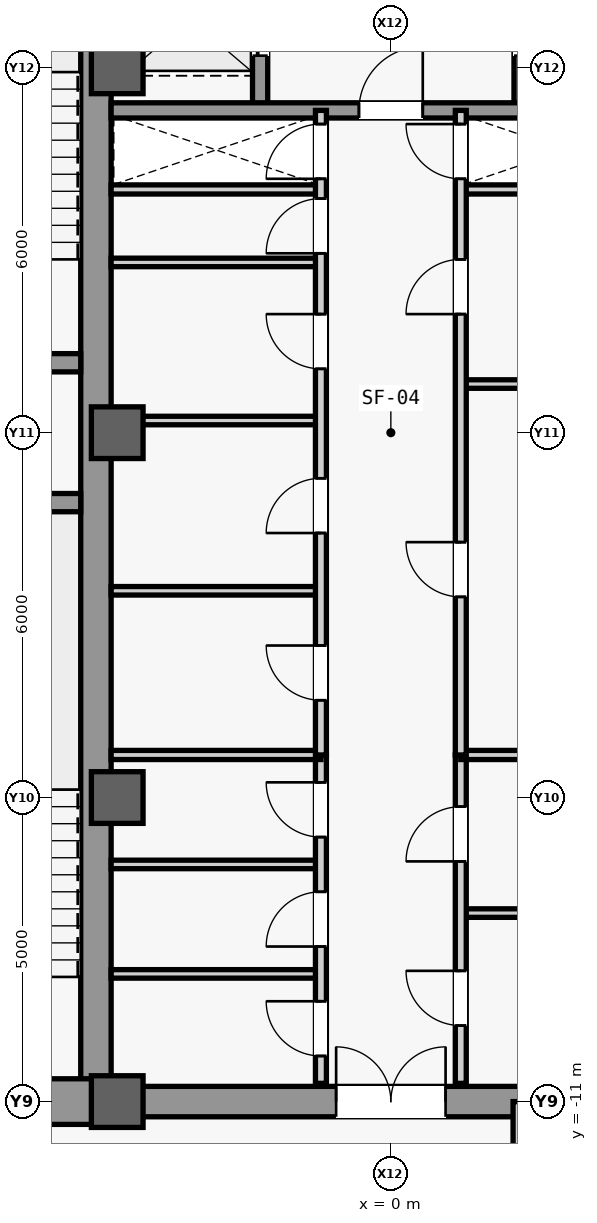
"""IFC4 building model, lengths in metres.
Left out: names, types, materials, properties, quantities, classifications, styles, units other than length and angle.
Written with IfcOpenShell. Run it as: python <this file> out.ifc"""

import sys

from ifc_helpers import new_model, si_unit, direction, frame, frame_2d, origin, origin_2d, place, context, subcontext, project, spatial, rectangle, extrude, source, transform, mapped, element, fill, save


model = new_model("IFC4")
c1 = context("Model", 3, precision=1e-05, world=origin(), true_north=direction((0.0, 1.0)))
c2 = subcontext(c1, "Body", "Model", "MODEL_VIEW")
j1 = project(units=[si_unit("LENGTHUNIT", "METRE"), si_unit("PLANEANGLEUNIT", "RADIAN")], contexts=[c1])
p1 = place(None, origin())
s1 = spatial("IfcSite", under=j1, at=p1, CompositionType="ELEMENT")
p2 = place(p1, origin())
s2 = spatial("IfcBuilding", under=s1, at=p2, CompositionType="ELEMENT")
p3 = place(p2, frame((0.0, 0.0, 195.1)))
s3 = spatial("IfcBuildingStorey", under=s2, at=p3, CompositionType="ELEMENT", Elevation=195.1)
m1 = source(origin(), c2, "Body", "SweptSolid", [
    extrude(rectangle(XDim=21.4, YDim=0.5, at=frame_2d((10.7, 0.0))), origin(), (0.0, 0.0, 1.0), 3.78),
])
p4 = place(p3, frame((-4.85, -10.7, 0.0), z_axis=(0.0, 0.0, 1.0), x_axis=(0.0, 1.0, 0.0)))
e1 = element("IfcWall", 1, at=p4, inside=s3, PredefinedType="SHEAR", context=c2, shape_type="MappedRepresentation", body=[
    mapped(m1, transform((0.0, 0.0, 0.0), scale=1.0)),
])
m2 = source(origin(), c2, "Body", "SweptSolid", [
    extrude(rectangle(XDim=5.85, YDim=0.75, at=frame_2d((2.925, 0.0))), origin(), (0.0, 0.0, 1.0), 3.78),
])
p5 = place(p3, frame((-10.7, -11.0, 0.0), z_axis=(0.0, 0.0, 1.0), x_axis=(1.0, 0.0, 0.0)))
e2 = element("IfcWall", 2, at=p5, inside=s3, PredefinedType="SHEAR", context=c2, shape_type="MappedRepresentation", body=[
    mapped(m2, transform((0.0, 0.0, 0.0), scale=1.0)),
])
m3 = source(origin(), c2, "Body", "SweptSolid", [
    extrude(rectangle(XDim=5.6, YDim=0.3, at=frame_2d((2.8, 0.0))), origin(), (0.0, 0.0, 1.0), 3.78),
])
for number, where, z_axis, x_axis in (
    (3, (-10.7, -1.15, 0.0), (0.0, 0.0, 1.0), (1.0, 0.0, 0.0)),
    (4, (-10.7, 1.15, 0.0), (0.0, 0.0, 1.0), (1.0, 0.0, 0.0)),
):
    element("IfcWall", number, at=place(p3, frame(where, z_axis=z_axis, x_axis=x_axis)), inside=s3, PredefinedType="SHEAR", context=c2, shape_type="MappedRepresentation", body=[
        mapped(m3, transform((0.0, 0.0, 0.0), scale=1.0)),
    ])
m4 = source(origin(), c2, "Body", "SweptSolid", [
    extrude(rectangle(XDim=9.2, YDim=0.5, at=frame_2d((4.6, 0.0))), origin(), (0.0, 0.0, 1.0), 3.78),
])
p6 = place(p3, frame((-4.6, -11.0, 0.0), z_axis=(0.0, 0.0, 1.0), x_axis=(1.0, 0.0, 0.0)))
e5 = element("IfcWall", 5, at=p6, inside=s3, PredefinedType="SHEAR", context=c2, shape_type="MappedRepresentation", body=[
    mapped(m4, transform((0.0, 0.0, 0.0), scale=1.0)),
])
m5 = source(origin(), c2, "Body", "SweptSolid", [
    extrude(rectangle(XDim=1.8, YDim=2.25, at=frame_2d((0.9, 1.125))), frame((0.0, 0.26, 0.0), z_axis=(0.0, -1.0, 0.0), x_axis=(1.0, 0.0, 0.0)), (0.0, 0.0, 1.0), 0.52),
])
p7 = place(p6, frame((3.7, 0.0, 0.0)))
e6 = element("IfcOpeningElement", 6, at=p7, cuts=e5, PredefinedType="OPENING", context=c2, shape_type="MappedRepresentation", body=[
    mapped(m5, transform((0.0, 0.0, 0.0), scale=1.0)),
])
m6 = source(origin(), c2, "Body", "SweptSolid", [
    extrude(rectangle(XDim=0.85, YDim=0.85, at=origin_2d()), origin(), (0.0, 0.0, 1.0), 4.0),
])
for number, where, z_axis, x_axis in (
    (7, (-4.5, -11.0, 0.0), (0.0, 0.0, 1.0), (1.0, 0.0, 0.0)),
    (8, (-4.5, -6.0, 0.0), (0.0, 0.0, 1.0), (1.0, 0.0, 0.0)),
    (9, (-4.5, 0.0, 0.0), (0.0, 0.0, 1.0), (1.0, 0.0, 0.0)),
    (10, (-4.5, 6.0, 0.0), (0.0, 0.0, 1.0), (1.0, 0.0, 0.0)),
):
    element("IfcColumn", number, at=place(p3, frame(where, z_axis=z_axis, x_axis=x_axis)), inside=s3, PredefinedType="COLUMN", context=c2, shape_type="MappedRepresentation", body=[
        mapped(m6, transform((0.0, 0.0, 0.0), scale=1.0)),
    ])
m7 = source(origin(), c2, "Body", "SweptSolid", [
    extrude(rectangle(XDim=3.45, YDim=0.15, at=frame_2d((1.725, 0.0))), origin(), (0.0, 0.0, 1.0), 3.78),
])
for number, where, z_axis, x_axis in (
    (11, (-4.6, 4.0, 0.0), (0.0, 0.0, 1.0), (1.0, 0.0, 0.0)),
    (12, (1.15, 4.0, 0.0), (0.0, 0.0, 1.0), (1.0, 0.0, 0.0)),
):
    element("IfcWall", number, at=place(p3, frame(where, z_axis=z_axis, x_axis=x_axis)), inside=s3, PredefinedType="PARTITIONING", context=c2, shape_type="MappedRepresentation", body=[
        mapped(m7, transform((0.0, 0.0, 0.0), scale=1.0)),
    ])
m8 = source(origin(), c2, "Body", "SweptSolid", [
    extrude(rectangle(XDim=3.45, YDim=0.14, at=frame_2d((1.725, 0.0))), origin(), (0.0, 0.0, 1.0), 3.78),
])
for number, where, z_axis, x_axis in (
    (13, (-4.6, -8.9, 0.0), (0.0, 0.0, 1.0), (1.0, 0.0, 0.0)),
    (14, (-4.6, -7.1, 0.0), (0.0, 0.0, 1.0), (1.0, 0.0, 0.0)),
):
    element("IfcWall", number, at=place(p3, frame(where, z_axis=z_axis, x_axis=x_axis)), inside=s3, PredefinedType="PARTITIONING", context=c2, shape_type="MappedRepresentation", body=[
        mapped(m8, transform((0.0, 0.0, 0.0), scale=1.0)),
    ])
m9 = source(origin(), c2, "Body", "SweptSolid", [
    extrude(rectangle(XDim=5.4, YDim=0.18, at=frame_2d((2.7, 0.0))), origin(), (0.0, 0.0, 1.0), 3.78),
])
p8 = place(p3, frame((-1.15, -10.7, 0.0), z_axis=(0.0, 0.0, 1.0), x_axis=(0.0, 1.0, 0.0)))
e15 = element("IfcWall", 15, at=p8, inside=s3, PredefinedType="PARTITIONING", context=c2, shape_type="MappedRepresentation", body=[
    mapped(m9, transform((0.0, 0.0, 0.0), scale=1.0)),
])
m10 = source(origin(), c2, "Body", "SweptSolid", [
    extrude(rectangle(XDim=0.9, YDim=2.15, at=frame_2d((0.45, 1.075))), frame((0.0, 0.1, 0.0), z_axis=(0.0, -1.0, 0.0), x_axis=(1.0, 0.0, 0.0)), (0.0, 0.0, 1.0), 0.2),
])
p9 = place(p8, frame((0.45, 0.0, 0.0)))
e16 = element("IfcOpeningElement", 16, at=p9, cuts=e15, PredefinedType="OPENING", context=c2, shape_type="MappedRepresentation", body=[
    mapped(m10, transform((0.0, 0.0, 0.0), scale=1.0)),
])
p10 = place(p8, frame((2.25, 0.0, 0.0)))
e17 = element("IfcOpeningElement", 17, at=p10, cuts=e15, PredefinedType="OPENING", context=c2, shape_type="MappedRepresentation", body=[
    mapped(m10, transform((0.0, 0.0, 0.0), scale=1.0)),
])
p11 = place(p8, frame((4.05, 0.0, 0.0)))
e18 = element("IfcOpeningElement", 18, at=p11, cuts=e15, PredefinedType="OPENING", context=c2, shape_type="MappedRepresentation", body=[
    mapped(m10, transform((0.0, 0.0, 0.0), scale=1.0)),
])
p12 = place(p3, frame((1.15, -7.9, 0.0), z_axis=(0.0, 0.0, 1.0), x_axis=(1.0, 0.0, 0.0)))
e19 = element("IfcWall", 19, at=p12, inside=s3, PredefinedType="PARTITIONING", context=c2, shape_type="MappedRepresentation", body=[
    mapped(m8, transform((0.0, 0.0, 0.0), scale=1.0)),
])
p13 = place(p3, frame((1.15, -10.7, 0.0), z_axis=(0.0, 0.0, 1.0), x_axis=(0.0, 1.0, 0.0)))
e20 = element("IfcWall", 20, at=p13, inside=s3, PredefinedType="PARTITIONING", context=c2, shape_type="MappedRepresentation", body=[
    mapped(m9, transform((0.0, 0.0, 0.0), scale=1.0)),
])
p14 = place(p13, frame((0.95, 0.0, 0.0)))
e21 = element("IfcOpeningElement", 21, at=p14, cuts=e20, PredefinedType="OPENING", context=c2, shape_type="MappedRepresentation", body=[
    mapped(m10, transform((0.0, 0.0, 0.0), scale=1.0)),
])
p15 = place(p13, frame((3.65, 0.0, 0.0)))
e22 = element("IfcOpeningElement", 22, at=p15, cuts=e20, PredefinedType="OPENING", context=c2, shape_type="MappedRepresentation", body=[
    mapped(m10, transform((0.0, 0.0, 0.0), scale=1.0)),
])
for number, where, z_axis, x_axis in (
    (23, (-4.6, -5.3, 0.0), (0.0, 0.0, 1.0), (1.0, 0.0, 0.0)),
    (24, (1.15, -5.3, 0.0), (0.0, 0.0, 1.0), (1.0, 0.0, 0.0)),
):
    element("IfcWall", number, at=place(p3, frame(where, z_axis=z_axis, x_axis=x_axis)), inside=s3, PredefinedType="PARTITIONING", context=c2, shape_type="MappedRepresentation", body=[
        mapped(m7, transform((0.0, 0.0, 0.0), scale=1.0)),
    ])
m11 = source(origin(), c2, "Body", "SweptSolid", [
    extrude(rectangle(XDim=5.4, YDim=0.25, at=frame_2d((2.7, 0.0))), origin(), (0.0, 0.0, 1.0), 3.78),
])
p16 = place(p3, frame((-2.15, 5.3, 0.0), z_axis=(0.0, 0.0, 1.0), x_axis=(0.0, 1.0, 0.0)))
e25 = element("IfcWall", 25, at=p16, inside=s3, PredefinedType="SHEAR", context=c2, shape_type="MappedRepresentation", body=[
    mapped(m11, transform((0.0, 0.0, 0.0), scale=1.0)),
])
m12 = source(origin(), c2, "Body", "SweptSolid", [
    extrude(rectangle(XDim=1.2, YDim=2.3, at=frame_2d((0.6, 1.15))), frame((0.0, 0.135, 0.0), z_axis=(0.0, -1.0, 0.0), x_axis=(1.0, 0.0, 0.0)), (0.0, 0.0, 1.0), 0.27),
])
p17 = place(p16, frame((3.3, 0.0, 0.0)))
e26 = element("IfcOpeningElement", 26, at=p17, cuts=e25, PredefinedType="OPENING", context=c2, shape_type="MappedRepresentation", body=[
    mapped(m12, transform((0.0, 0.0, 0.0), scale=1.0)),
])
p18 = place(p16, frame((0.9, 0.0, 0.0)))
e27 = element("IfcOpeningElement", 27, at=p18, cuts=e25, PredefinedType="OPENING", context=c2, shape_type="MappedRepresentation", body=[
    mapped(m12, transform((0.0, 0.0, 0.0), scale=1.0)),
])
p19 = place(p3, frame((2.15, 5.3, 0.0), z_axis=(0.0, 0.0, 1.0), x_axis=(0.0, 1.0, 0.0)))
e28 = element("IfcWall", 28, at=p19, inside=s3, PredefinedType="SHEAR", context=c2, shape_type="MappedRepresentation", body=[
    mapped(m11, transform((0.0, 0.0, 0.0), scale=1.0)),
])
p20 = place(p19, frame((3.3, 0.0, 0.0)))
e29 = element("IfcOpeningElement", 29, at=p20, cuts=e28, PredefinedType="OPENING", context=c2, shape_type="MappedRepresentation", body=[
    mapped(m12, transform((0.0, 0.0, 0.0), scale=1.0)),
])
p21 = place(p19, frame((0.9, 0.0, 0.0)))
e30 = element("IfcOpeningElement", 30, at=p21, cuts=e28, PredefinedType="OPENING", context=c2, shape_type="MappedRepresentation", body=[
    mapped(m12, transform((0.0, 0.0, 0.0), scale=1.0)),
])
m13 = source(origin(), c2, "Body", "SweptSolid", [
    extrude(rectangle(XDim=9.2, YDim=0.25, at=frame_2d((4.6, 0.0))), origin(), (0.0, 0.0, 1.0), 3.78),
])
p22 = place(p3, frame((-4.6, 5.3, 0.0), z_axis=(0.0, 0.0, 1.0), x_axis=(1.0, 0.0, 0.0)))
e31 = element("IfcWall", 31, at=p22, inside=s3, PredefinedType="SHEAR", context=c2, shape_type="MappedRepresentation", body=[
    mapped(m13, transform((0.0, 0.0, 0.0), scale=1.0)),
])
m14 = source(origin(), c2, "Body", "SweptSolid", [
    extrude(rectangle(XDim=1.05, YDim=2.2, at=frame_2d((0.525, 1.1))), frame((0.0, 0.135, 0.0), z_axis=(0.0, -1.0, 0.0), x_axis=(1.0, 0.0, 0.0)), (0.0, 0.0, 1.0), 0.27),
])
p23 = place(p22, frame((4.075, 0.0, 0.0)))
e32 = element("IfcOpeningElement", 32, at=p23, cuts=e31, PredefinedType="OPENING", context=c2, shape_type="MappedRepresentation", body=[
    mapped(m14, transform((0.0, 0.0, 0.0), scale=1.0)),
])
p24 = place(p3, frame((-4.6, -2.6, 0.0), z_axis=(0.0, 0.0, 1.0), x_axis=(1.0, 0.0, 0.0)))
e33 = element("IfcWall", 33, at=p24, inside=s3, PredefinedType="PARTITIONING", context=c2, shape_type="MappedRepresentation", body=[
    mapped(m8, transform((0.0, 0.0, 0.0), scale=1.0)),
])
m15 = source(origin(), c2, "Body", "SweptSolid", [
    extrude(rectangle(XDim=3.45, YDim=0.14, at=frame_2d((1.725, 0.0))), origin(), (0.0, 0.0, 1.0), 3.085),
])
p25 = place(p3, frame((-4.6, 0.2, 0.0), z_axis=(0.0, 0.0, 1.0), x_axis=(1.0, 0.0, 0.0)))
e34 = element("IfcWall", 34, at=p25, inside=s3, PredefinedType="PARTITIONING", context=c2, shape_type="MappedRepresentation", body=[
    mapped(m15, transform((0.0, 0.0, 0.0), scale=1.0)),
])
p26 = place(p3, frame((-4.6, 2.8, 0.0), z_axis=(0.0, 0.0, 1.0), x_axis=(1.0, 0.0, 0.0)))
e35 = element("IfcWall", 35, at=p26, inside=s3, PredefinedType="PARTITIONING", context=c2, shape_type="MappedRepresentation", body=[
    mapped(m8, transform((0.0, 0.0, 0.0), scale=1.0)),
])
m16 = source(origin(), c2, "Body", "SweptSolid", [
    extrude(rectangle(XDim=10.6, YDim=0.18, at=frame_2d((5.3, 0.0))), origin(), (0.0, 0.0, 1.0), 3.78),
])
p27 = place(p3, frame((-1.15, -5.3, 0.0), z_axis=(0.0, 0.0, 1.0), x_axis=(0.0, 1.0, 0.0)))
e36 = element("IfcWall", 36, at=p27, inside=s3, PredefinedType="PARTITIONING", context=c2, shape_type="MappedRepresentation", body=[
    mapped(m16, transform((0.0, 0.0, 0.0), scale=1.0)),
])
p28 = place(p27, frame((0.9, 0.0, 0.0)))
e37 = element("IfcOpeningElement", 37, at=p28, cuts=e36, PredefinedType="OPENING", context=c2, shape_type="MappedRepresentation", body=[
    mapped(m10, transform((0.0, 0.0, 0.0), scale=1.0)),
])
p29 = place(p27, frame((3.65, 0.0, 0.0)))
e38 = element("IfcOpeningElement", 38, at=p29, cuts=e36, PredefinedType="OPENING", context=c2, shape_type="MappedRepresentation", body=[
    mapped(m10, transform((0.0, 0.0, 0.0), scale=1.0)),
])
p30 = place(p27, frame((6.35, 0.0, 0.0)))
e39 = element("IfcOpeningElement", 39, at=p30, cuts=e36, PredefinedType="OPENING", context=c2, shape_type="MappedRepresentation", body=[
    mapped(m10, transform((0.0, 0.0, 0.0), scale=1.0)),
])
p31 = place(p27, frame((8.25, 0.0, 0.0)))
e40 = element("IfcOpeningElement", 40, at=p31, cuts=e36, PredefinedType="OPENING", context=c2, shape_type="MappedRepresentation", body=[
    mapped(m10, transform((0.0, 0.0, 0.0), scale=1.0)),
])
p32 = place(p27, frame((9.475, 0.0, 0.0)))
e41 = element("IfcOpeningElement", 41, at=p32, cuts=e36, PredefinedType="OPENING", context=c2, shape_type="MappedRepresentation", body=[
    mapped(m10, transform((0.0, 0.0, 0.0), scale=1.0)),
])
p33 = place(p3, frame((1.15, 0.8, 0.0), z_axis=(0.0, 0.0, 1.0), x_axis=(1.0, 0.0, 0.0)))
e42 = element("IfcWall", 42, at=p33, inside=s3, PredefinedType="PARTITIONING", context=c2, shape_type="MappedRepresentation", body=[
    mapped(m8, transform((0.0, 0.0, 0.0), scale=1.0)),
])
p34 = place(p3, frame((1.15, -5.3, 0.0), z_axis=(0.0, 0.0, 1.0), x_axis=(0.0, 1.0, 0.0)))
e43 = element("IfcWall", 43, at=p34, inside=s3, PredefinedType="PARTITIONING", context=c2, shape_type="MappedRepresentation", body=[
    mapped(m16, transform((0.0, 0.0, 0.0), scale=1.0)),
])
p35 = place(p34, frame((2.6, 0.0, 0.0)))
e44 = element("IfcOpeningElement", 44, at=p35, cuts=e43, PredefinedType="OPENING", context=c2, shape_type="MappedRepresentation", body=[
    mapped(m10, transform((0.0, 0.0, 0.0), scale=1.0)),
])
p36 = place(p34, frame((7.25, 0.0, 0.0)))
e45 = element("IfcOpeningElement", 45, at=p36, cuts=e43, PredefinedType="OPENING", context=c2, shape_type="MappedRepresentation", body=[
    mapped(m10, transform((0.0, 0.0, 0.0), scale=1.0)),
])
p37 = place(p34, frame((9.475, 0.0, 0.0)))
e46 = element("IfcOpeningElement", 46, at=p37, cuts=e43, PredefinedType="OPENING", context=c2, shape_type="MappedRepresentation", body=[
    mapped(m10, transform((0.0, 0.0, 0.0), scale=1.0)),
])
m17 = source(origin(), c2, "Body", "SweptSolid", [
    extrude(rectangle(XDim=3.2, YDim=0.18, at=frame_2d((1.6, 0.0))), origin(), (0.0, 0.0, 1.0), 3.78),
])
p38 = place(p3, frame((2.1, -14.2, 0.0), z_axis=(0.0, 0.0, 1.0), x_axis=(0.0, 1.0, 0.0)))
e47 = element("IfcWall", 47, at=p38, inside=s3, PredefinedType="PARTITIONING", context=c2, shape_type="MappedRepresentation", body=[
    mapped(m17, transform((0.0, 0.0, 0.0), scale=1.0)),
])
m18 = source(origin(), c2, "Body", "SweptSolid", [
    extrude(rectangle(XDim=0.9, YDim=2.15, at=frame_2d((0.45, 1.075))), frame((0.0, 0.025, 0.0), z_axis=(0.0, -1.0, 0.0), x_axis=(1.0, 0.0, 0.0)), (0.0, 0.0, 1.0), 0.05),
])
p39 = place(p9, origin())
e48 = element("IfcDoor", 48, at=p39, inside=s3, OperationType="SINGLE_SWING_RIGHT", PredefinedType="DOOR", context=c2, shape_type="MappedRepresentation", body=[
    mapped(m18, transform((0.0, 0.0, 0.0), scale=1.0)),
])
fill(e16, e48)
p40 = place(p10, origin())
e49 = element("IfcDoor", 49, at=p40, inside=s3, OperationType="SINGLE_SWING_LEFT", PredefinedType="DOOR", context=c2, shape_type="MappedRepresentation", body=[
    mapped(m18, transform((0.0, 0.0, 0.0), scale=1.0)),
])
fill(e17, e49)
p41 = place(p11, origin())
e50 = element("IfcDoor", 50, at=p41, inside=s3, OperationType="SINGLE_SWING_RIGHT", PredefinedType="DOOR", context=c2, shape_type="MappedRepresentation", body=[
    mapped(m18, transform((0.0, 0.0, 0.0), scale=1.0)),
])
fill(e18, e50)
p42 = place(p14, origin())
e51 = element("IfcDoor", 51, at=p42, inside=s3, OperationType="SINGLE_SWING_RIGHT", PredefinedType="DOOR", context=c2, shape_type="MappedRepresentation", body=[
    mapped(m18, transform((0.0, 0.0, 0.0), scale=1.0)),
])
fill(e21, e51)
p43 = place(p15, origin())
e52 = element("IfcDoor", 52, at=p43, inside=s3, OperationType="SINGLE_SWING_LEFT", PredefinedType="DOOR", context=c2, shape_type="MappedRepresentation", body=[
    mapped(m18, transform((0.0, 0.0, 0.0), scale=1.0)),
])
fill(e22, e52)
m19 = source(origin(), c2, "Body", "SweptSolid", [
    extrude(rectangle(XDim=1.8, YDim=2.25, at=frame_2d((0.9, 1.125))), frame((0.0, 0.025, 0.0), z_axis=(0.0, -1.0, 0.0), x_axis=(1.0, 0.0, 0.0)), (0.0, 0.0, 1.0), 0.05),
])
p44 = place(p7, origin())
e53 = element("IfcDoor", 53, at=p44, inside=s3, OperationType="SINGLE_SWING_LEFT", PredefinedType="DOOR", context=c2, shape_type="MappedRepresentation", body=[
    mapped(m19, transform((0.0, 0.0, 0.0), scale=1.0)),
])
fill(e6, e53)
m20 = source(origin(), c2, "Body", "SweptSolid", [
    extrude(rectangle(XDim=1.05, YDim=2.2, at=frame_2d((0.525, 1.1))), frame((0.0, 0.025, 0.0), z_axis=(0.0, -1.0, 0.0), x_axis=(1.0, 0.0, 0.0)), (0.0, 0.0, 1.0), 0.05),
])
p45 = place(p23, origin())
e54 = element("IfcDoor", 54, at=p45, inside=s3, OperationType="SINGLE_SWING_RIGHT", PredefinedType="DOOR", context=c2, shape_type="MappedRepresentation", body=[
    mapped(m20, transform((0.0, 0.0, 0.0), scale=1.0)),
])
fill(e32, e54)
p46 = place(p28, origin())
e55 = element("IfcDoor", 55, at=p46, inside=s3, OperationType="SINGLE_SWING_RIGHT", PredefinedType="DOOR", context=c2, shape_type="MappedRepresentation", body=[
    mapped(m18, transform((0.0, 0.0, 0.0), scale=1.0)),
])
fill(e37, e55)
p47 = place(p29, origin())
e56 = element("IfcDoor", 56, at=p47, inside=s3, OperationType="SINGLE_SWING_LEFT", PredefinedType="DOOR", context=c2, shape_type="MappedRepresentation", body=[
    mapped(m18, transform((0.0, 0.0, 0.0), scale=1.0)),
])
fill(e38, e56)
p48 = place(p30, origin())
e57 = element("IfcDoor", 57, at=p48, inside=s3, OperationType="SINGLE_SWING_RIGHT", PredefinedType="DOOR", context=c2, shape_type="MappedRepresentation", body=[
    mapped(m18, transform((0.0, 0.0, 0.0), scale=1.0)),
])
fill(e39, e57)
p49 = place(p31, origin())
e58 = element("IfcDoor", 58, at=p49, inside=s3, OperationType="SINGLE_SWING_LEFT", PredefinedType="DOOR", context=c2, shape_type="MappedRepresentation", body=[
    mapped(m18, transform((0.0, 0.0, 0.0), scale=1.0)),
])
fill(e40, e58)
p50 = place(p35, origin())
e59 = element("IfcDoor", 59, at=p50, inside=s3, OperationType="SINGLE_SWING_RIGHT", PredefinedType="DOOR", context=c2, shape_type="MappedRepresentation", body=[
    mapped(m18, transform((0.0, 0.0, 0.0), scale=1.0)),
])
fill(e44, e59)
p51 = place(p36, origin())
e60 = element("IfcDoor", 60, at=p51, inside=s3, OperationType="SINGLE_SWING_LEFT", PredefinedType="DOOR", context=c2, shape_type="MappedRepresentation", body=[
    mapped(m18, transform((0.0, 0.0, 0.0), scale=1.0)),
])
fill(e45, e60)
p52 = place(p32, origin())
e61 = element("IfcDoor", 61, at=p52, inside=s3, OperationType="SINGLE_SWING_LEFT", PredefinedType="DOOR", context=c2, shape_type="MappedRepresentation", body=[
    mapped(m18, transform((0.0, 0.0, 0.0), scale=1.0)),
])
fill(e41, e61)
p53 = place(p37, origin())
e62 = element("IfcDoor", 62, at=p53, inside=s3, OperationType="SINGLE_SWING_RIGHT", PredefinedType="DOOR", context=c2, shape_type="MappedRepresentation", body=[
    mapped(m18, transform((0.0, 0.0, 0.0), scale=1.0)),
])
fill(e46, e62)
m21 = source(origin(), c2, "Body", "SweptSolid", [
    extrude(rectangle(XDim=1.2, YDim=2.3, at=frame_2d((0.6, 1.15))), frame((0.0, 0.025, 0.0), z_axis=(0.0, -1.0, 0.0), x_axis=(1.0, 0.0, 0.0)), (0.0, 0.0, 1.0), 0.05),
])
p54 = place(p18, origin())
e63 = element("IfcDoor", 63, at=p54, inside=s3, OperationType="SLIDING_TO_LEFT", PredefinedType="DOOR", context=c2, shape_type="MappedRepresentation", body=[
    mapped(m21, transform((0.0, 0.0, 0.0), scale=1.0)),
])
fill(e27, e63)
save(model, sys.argv[1])
